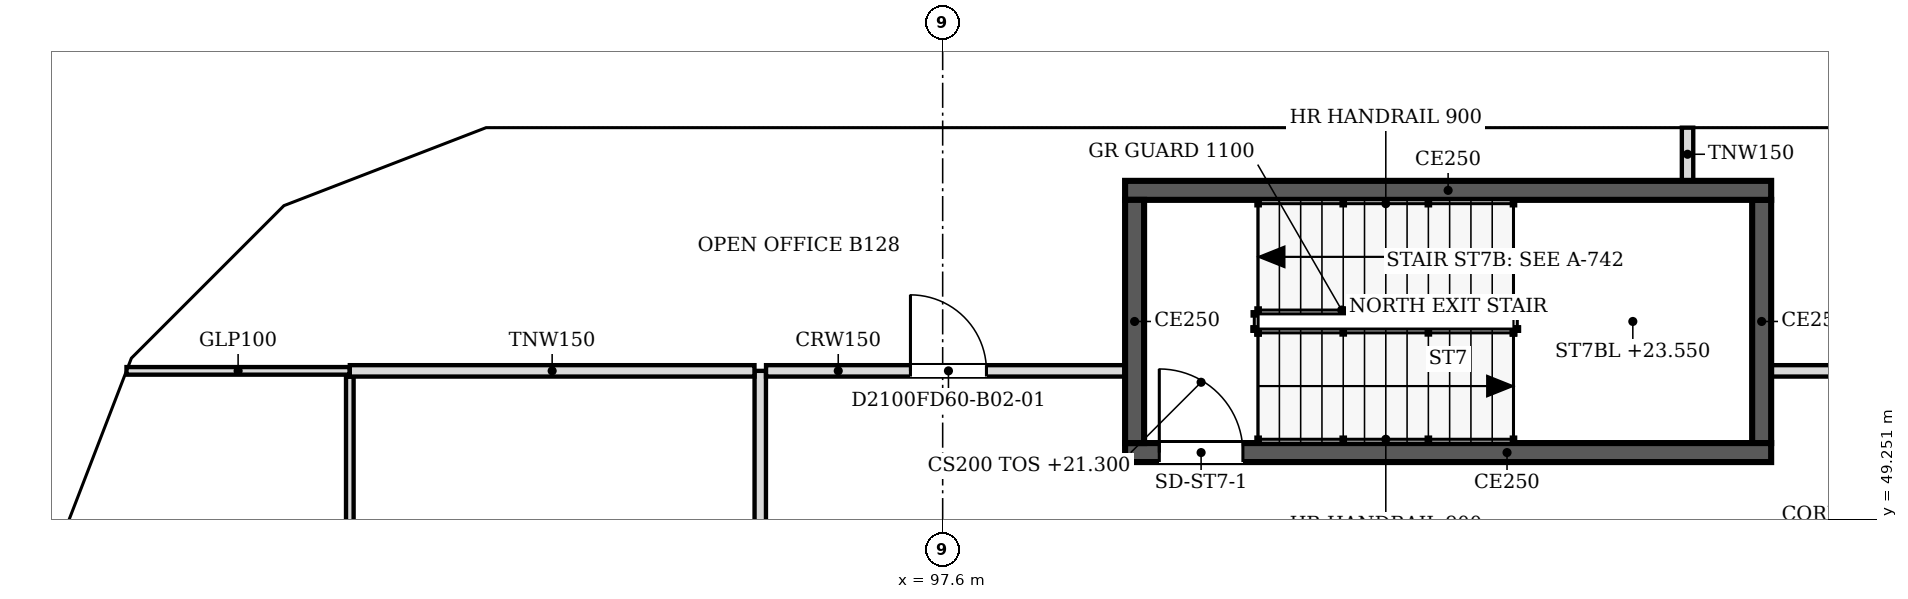
"""IFC4 building model, lengths in metres.
Left out: names, types, materials, properties, quantities, classifications, styles, units other than length and angle.
Written with IfcOpenShell. Run it as: python <this file> out.ifc"""

import sys

from ifc_helpers import new_model, si_unit, direction, frame, frame_2d, origin, place, context, subcontext, project, spatial, polyline, rectangle, outline, extrude, faceted_brep, source, transform, mapped, element, fill, save


model = new_model("IFC4")
c1 = context("Model", 3, precision=1e-05, world=origin(), true_north=direction((0.0, 1.0)))
c2 = subcontext(c1, "Body", "Model", "MODEL_VIEW")
j1 = project(units=[si_unit("LENGTHUNIT", "METRE"), si_unit("PLANEANGLEUNIT", "RADIAN")], contexts=[c1])
p1 = place(None, origin())
s1 = spatial("IfcSite", under=j1, at=p1, CompositionType="ELEMENT")
p2 = place(p1, origin())
s2 = spatial("IfcBuilding", under=s1, at=p2, CompositionType="ELEMENT")
p3 = place(p2, frame((0.0, 0.0, 21.3)))
s3 = spatial("IfcBuildingStorey", under=s2, at=p3, CompositionType="ELEMENT", Elevation=21.3)
m1 = source(origin(), c2, "Body", "SweptSolid", [
    extrude(outline(polyline([(3.05, 0.0), (6.1, 4.5), (3.05, 9.0), (0.0, 4.5), (3.05, 0.0)])), frame((0.0, 0.25, 0.0), z_axis=(0.0, -1.0, 0.0), x_axis=(1.0, 0.0, 0.0)), (0.0, 0.0, 1.0), 0.5),
])
p4 = place(p3, frame((109.8, 54.65, -4.5), z_axis=(0.0, 0.0, 1.0), x_axis=(-1.0, 0.0, 0.0)))
e1 = element("IfcWall", 1, at=p4, inside=s3, PredefinedType="SOLIDWALL", context=c2, shape_type="MappedRepresentation", body=[
    mapped(m1, transform((0.0, 0.0, 0.0), scale=1.0)),
])
m2 = source(origin(), c2, "Body", "SweptSolid", [
    extrude(outline(polyline([(3.05, 0.446), (5.798, 4.5), (3.05, 8.554), (0.302, 4.5), (3.05, 0.446)])), frame((0.0, 0.26, 0.0), z_axis=(0.0, -1.0, 0.0), x_axis=(1.0, 0.0, 0.0)), (0.0, 0.0, 1.0), 0.52),
])
p5 = place(p4, origin())
e2 = element("IfcOpeningElement", 2, at=p5, cuts=e1, PredefinedType="OPENING", context=c2, shape_type="MappedRepresentation", body=[
    mapped(m2, transform((0.0, 0.0, 0.0), scale=1.0)),
])
m3 = source(origin(), c2, "Body", "Brep", [
    faceted_brep([(3.05, -0.25, 0.0), (6.1, -0.25, 4.5), (6.1, -0.25, 4.5), (3.05, -0.25, 9.0), (0.0, -0.25, 4.5), (0.0, 0.25, 4.5), (3.05, 0.25, 9.0), (6.1, 0.25, 4.5), (6.1, 0.25, 4.5), (3.05, 0.25, 0.0)], [[[0, 1, 2, 3, 4]], [[5, 6, 7, 8, 9]], [[9, 8, 1, 0]], [[7, 6, 3, 2]], [[6, 5, 4, 3]], [[5, 9, 0, 4]], [[1, 8, 7, 2]]]),
])
p6 = place(p3, frame((103.7, 54.65, -4.5), z_axis=(0.0, 0.0, 1.0), x_axis=(-1.0, 0.0, 0.0)))
e3 = element("IfcWall", 3, at=p6, inside=s3, PredefinedType="SOLIDWALL", context=c2, shape_type="MappedRepresentation", body=[
    mapped(m3, transform((0.0, 0.0, 0.0), scale=1.0)),
])
p7 = place(p6, origin())
e4 = element("IfcOpeningElement", 4, at=p7, cuts=e3, PredefinedType="OPENING", context=c2, shape_type="MappedRepresentation", body=[
    mapped(m2, transform((0.0, 0.0, 0.0), scale=1.0)),
])
m4 = source(origin(), c2, "Body", "Brep", [
    faceted_brep([(3.05, -0.25, 0.0), (6.053, -0.25, 4.5), (3.05, -0.25, 9.0), (0.0, -0.25, 4.5), (0.0, 0.25, 4.5), (3.05, 0.25, 9.0), (6.007, 0.25, 4.57), (6.007, 0.25, 4.43), (3.05, 0.25, 0.0), (6.053, 0.0, 4.5)], [[[0, 1, 2, 3]], [[4, 5, 6, 7, 8]], [[8, 7, 9, 1, 0]], [[6, 5, 2, 1, 9]], [[5, 4, 3, 2]], [[4, 8, 0, 3]], [[9, 7, 6]]]),
])
p8 = place(p3, frame((97.6, 54.65, -4.5), z_axis=(0.0, 0.0, 1.0), x_axis=(-1.0, 0.0, 0.0)))
e5 = element("IfcWall", 5, at=p8, inside=s3, PredefinedType="SOLIDWALL", context=c2, shape_type="MappedRepresentation", body=[
    mapped(m4, transform((0.0, 0.0, 0.0), scale=1.0)),
])
m5 = source(origin(), c2, "Body", "SweptSolid", [
    extrude(outline(polyline([(3.048, 0.448), (5.753, 4.5), (3.048, 8.552), (0.302, 4.5), (3.048, 0.448)])), frame((0.0, 0.26, 0.0), z_axis=(0.0, -1.0, 0.0), x_axis=(1.0, 0.0, 0.0)), (0.0, 0.0, 1.0), 0.52),
])
p9 = place(p8, origin())
e6 = element("IfcOpeningElement", 6, at=p9, cuts=e5, PredefinedType="OPENING", context=c2, shape_type="MappedRepresentation", body=[
    mapped(m5, transform((0.0, 0.0, 0.0), scale=1.0)),
])
m6 = source(origin(), c2, "Body", "Brep", [
    faceted_brep([(2.95, -0.25, 0.0), (3.003, -0.25, 0.081), (3.003, -0.25, 8.919), (2.95, -0.25, 9.0), (0.0, -0.25, 4.5), (0.047, 0.25, 4.571), (2.898, 0.25, 8.919), (2.898, 0.25, 0.081), (0.047, 0.25, 4.429), (2.95, 0.0, 0.0), (2.95, 0.0, 9.0), (0.0, 0.0, 4.5)], [[[0, 1, 2, 3, 4]], [[5, 6, 7, 8]], [[1, 0, 9]], [[10, 3, 2]], [[6, 5, 11, 4, 3, 10]], [[8, 7, 9, 0, 4, 11]], [[8, 11, 5]], [[1, 9, 7, 6, 10, 2]]]),
])
p10 = place(p3, frame((91.547, 54.65, -4.5), z_axis=(0.0, 0.0, 1.0), x_axis=(-0.933007896601, -0.359855894603, 0.0)))
e7 = element("IfcWall", 7, at=p10, inside=s3, PredefinedType="SOLIDWALL", context=c2, shape_type="MappedRepresentation", body=[
    mapped(m6, transform((0.0, 0.0, 0.0), scale=1.0)),
])
m7 = source(origin(), c2, "Body", "SweptSolid", [
    extrude(outline(polyline([(2.75, 8.239), (0.299, 4.5), (2.75, 0.761), (2.75, 8.239)])), frame((0.0, 0.26, 0.0), z_axis=(0.0, -1.0, 0.0), x_axis=(1.0, 0.0, 0.0)), (0.0, 0.0, 1.0), 0.52),
])
p11 = place(p10, origin())
e8 = element("IfcOpeningElement", 8, at=p11, cuts=e7, PredefinedType="OPENING", context=c2, shape_type="MappedRepresentation", body=[
    mapped(m7, transform((0.0, 0.0, 0.0), scale=1.0)),
])
m8 = source(origin(), c2, "Body", "Brep", [
    faceted_brep([(0.053, -0.25, 0.0), (2.997, -0.25, 4.5), (0.053, -0.25, 9.0), (0.0, -0.25, 8.919), (0.0, -0.25, 0.081), (0.106, 0.25, 8.919), (2.944, 0.25, 4.581), (2.944, 0.25, 4.419), (0.106, 0.25, 0.081), (2.997, 0.0, 4.5), (0.053, 0.0, 0.0), (0.053, 0.0, 9.0)], [[[0, 1, 2, 3, 4]], [[5, 6, 7, 8]], [[8, 7, 9, 1, 0, 10]], [[6, 5, 11, 2, 1, 9]], [[3, 2, 11]], [[10, 0, 4]], [[8, 10, 4, 3, 11, 5]], [[9, 7, 6]]]),
])
p12 = place(p3, frame((88.831, 53.625, -4.5), z_axis=(0.0, 0.0, 1.0), x_axis=(-0.707147509625, -0.707066050402, 0.0)))
e9 = element("IfcWall", 9, at=p12, inside=s3, PredefinedType="SOLIDWALL", context=c2, shape_type="MappedRepresentation", body=[
    mapped(m8, transform((0.0, 0.0, 0.0), scale=1.0)),
])
m9 = source(origin(), c2, "Body", "SweptSolid", [
    extrude(outline(polyline([(0.253, 0.762), (2.698, 4.5), (0.253, 8.238), (0.253, 0.762)])), frame((0.0, 0.26, 0.0), z_axis=(0.0, -1.0, 0.0), x_axis=(1.0, 0.0, 0.0)), (0.0, 0.0, 1.0), 0.52),
])
p13 = place(p12, origin())
e10 = element("IfcOpeningElement", 10, at=p13, cuts=e9, PredefinedType="OPENING", context=c2, shape_type="MappedRepresentation", body=[
    mapped(m9, transform((0.0, 0.0, 0.0), scale=1.0)),
])
m10 = source(origin(), c2, "Body", "Brep", [
    faceted_brep([(2.95, -0.25, 0.0), (2.997, -0.25, 0.07), (2.997, -0.25, 8.93), (2.95, -0.25, 9.0), (0.0, -0.25, 4.5), (0.053, 0.25, 4.581), (2.904, 0.25, 8.929), (2.904, 0.25, 0.071), (0.053, 0.25, 4.419), (2.95, 0.0, 0.0), (2.95, 0.0, 9.0), (0.0, 0.0, 4.5)], [[[0, 1, 2, 3, 4]], [[5, 6, 7, 8]], [[1, 0, 9]], [[10, 3, 2]], [[6, 5, 11, 4, 3, 10]], [[8, 7, 9, 0, 4, 11]], [[8, 11, 5]], [[1, 9, 7, 6, 10, 2]]]),
])
p14 = place(p3, frame((86.712, 51.506, -4.5), z_axis=(0.0, 0.0, 1.0), x_axis=(-0.359874094142, -0.933000876937, 0.0)))
e11 = element("IfcWall", 11, at=p14, inside=s3, PredefinedType="SOLIDWALL", context=c2, shape_type="MappedRepresentation", body=[
    mapped(m10, transform((0.0, 0.0, 0.0), scale=1.0)),
])
p15 = place(p14, origin())
e12 = element("IfcOpeningElement", 12, at=p15, cuts=e11, PredefinedType="OPENING", context=c2, shape_type="MappedRepresentation", body=[
    mapped(m7, transform((0.0, 0.0, 0.0), scale=1.0)),
])
m11 = source(origin(), c2, "Body", "SweptSolid", [
    extrude(outline(polyline([(3.05, 0.0), (6.1, 4.5), (0.0, 4.5), (3.05, 0.0)])), frame((0.0, 0.25, 0.0), z_axis=(0.0, -1.0, 0.0), x_axis=(1.0, 0.0, 0.0)), (0.0, 0.0, 1.0), 0.5),
])
p16 = place(p3, frame((112.85, 54.65, 0.0), z_axis=(0.0, 0.0, 1.0), x_axis=(-1.0, 0.0, 0.0)))
e13 = element("IfcWall", 13, at=p16, inside=s3, PredefinedType="SOLIDWALL", context=c2, shape_type="MappedRepresentation", body=[
    mapped(m11, transform((0.0, 0.0, 0.0), scale=1.0)),
])
m12 = source(origin(), c2, "Body", "SweptSolid", [
    extrude(outline(polyline([(3.05, 0.446), (5.629, 4.25), (0.471, 4.25), (3.05, 0.446)])), frame((0.0, 0.26, 0.0), z_axis=(0.0, -1.0, 0.0), x_axis=(1.0, 0.0, 0.0)), (0.0, 0.0, 1.0), 0.52),
])
p17 = place(p16, origin())
e14 = element("IfcOpeningElement", 14, at=p17, cuts=e13, PredefinedType="OPENING", context=c2, shape_type="MappedRepresentation", body=[
    mapped(m12, transform((0.0, 0.0, 0.0), scale=1.0)),
])
p18 = place(p3, frame((106.75, 54.65, 0.0), z_axis=(0.0, 0.0, 1.0), x_axis=(-1.0, 0.0, 0.0)))
e15 = element("IfcWall", 15, at=p18, inside=s3, PredefinedType="SOLIDWALL", context=c2, shape_type="MappedRepresentation", body=[
    mapped(m11, transform((0.0, 0.0, 0.0), scale=1.0)),
])
p19 = place(p18, origin())
e16 = element("IfcOpeningElement", 16, at=p19, cuts=e15, PredefinedType="OPENING", context=c2, shape_type="MappedRepresentation", body=[
    mapped(m12, transform((0.0, 0.0, 0.0), scale=1.0)),
])
m13 = source(origin(), c2, "Body", "Brep", [
    faceted_brep([(3.05, -0.25, 0.0), (6.1, -0.25, 4.5), (6.1, -0.25, 4.5), (0.0, -0.25, 4.5), (0.0, 0.25, 4.5), (6.1, 0.25, 4.5), (6.1, 0.25, 4.5), (3.05, 0.25, 0.0)], [[[0, 1, 2, 3]], [[4, 5, 6, 7]], [[7, 6, 1, 0]], [[5, 4, 3, 2]], [[4, 7, 0, 3]], [[1, 6, 5, 2]]]),
])
p20 = place(p3, frame((100.65, 54.65, 0.0), z_axis=(0.0, 0.0, 1.0), x_axis=(-1.0, 0.0, 0.0)))
e17 = element("IfcWall", 17, at=p20, inside=s3, PredefinedType="SOLIDWALL", context=c2, shape_type="MappedRepresentation", body=[
    mapped(m13, transform((0.0, 0.0, 0.0), scale=1.0)),
])
p21 = place(p20, origin())
e18 = element("IfcOpeningElement", 18, at=p21, cuts=e17, PredefinedType="OPENING", context=c2, shape_type="MappedRepresentation", body=[
    mapped(m12, transform((0.0, 0.0, 0.0), scale=1.0)),
])
m14 = source(origin(), c2, "Body", "Brep", [
    faceted_brep([(3.003, -0.25, 0.0), (3.05, -0.25, 0.071), (3.05, -0.25, 4.5), (0.0, -0.25, 4.5), (0.0, 0.25, 4.5), (2.957, 0.25, 4.5), (2.957, 0.25, 0.07), (3.003, 0.0, 0.0)], [[[0, 1, 2, 3]], [[4, 5, 6]], [[1, 0, 7]], [[5, 4, 3, 2]], [[4, 6, 7, 0, 3]], [[1, 7, 6, 5, 2]]]),
])
p22 = place(p3, frame((94.55, 54.65, 0.0), z_axis=(0.0, 0.0, 1.0), x_axis=(-1.0, 0.0, 0.0)))
e19 = element("IfcWall", 19, at=p22, inside=s3, PredefinedType="SOLIDWALL", context=c2, shape_type="MappedRepresentation", body=[
    mapped(m14, transform((0.0, 0.0, 0.0), scale=1.0)),
])
m15 = source(origin(), c2, "Body", "SweptSolid", [
    extrude(outline(polyline([(2.803, 4.25), (0.468, 4.25), (2.803, 0.75), (2.803, 4.25)])), frame((0.0, 0.26, 0.0), z_axis=(0.0, -1.0, 0.0), x_axis=(1.0, 0.0, 0.0)), (0.0, 0.0, 1.0), 0.52),
])
p23 = place(p22, origin())
e20 = element("IfcOpeningElement", 20, at=p23, cuts=e19, PredefinedType="OPENING", context=c2, shape_type="MappedRepresentation", body=[
    mapped(m15, transform((0.0, 0.0, 0.0), scale=1.0)),
])
m16 = source(origin(), c2, "Body", "Brep", [
    faceted_brep([(0.047, -0.25, 0.0), (2.997, -0.25, 4.5), (0.0, -0.25, 4.5), (0.0, -0.25, 0.07), (0.093, 0.25, 4.5), (2.944, 0.25, 4.5), (2.944, 0.25, 4.419), (0.093, 0.25, 0.071), (2.997, 0.0, 4.5), (0.047, 0.0, 0.0)], [[[0, 1, 2, 3]], [[4, 5, 6, 7]], [[7, 6, 8, 1, 0, 9]], [[5, 4, 2, 1, 8]], [[9, 0, 3]], [[7, 9, 3, 2, 4]], [[6, 5, 8]]]),
])
p24 = place(p3, frame((91.59, 54.667, 0.0), z_axis=(0.0, 0.0, 1.0), x_axis=(-0.933000876937, -0.359874094142, 0.0)))
e21 = element("IfcWall", 21, at=p24, inside=s3, PredefinedType="SOLIDWALL", context=c2, shape_type="MappedRepresentation", body=[
    mapped(m16, transform((0.0, 0.0, 0.0), scale=1.0)),
])
m17 = source(origin(), c2, "Body", "SweptSolid", [
    extrude(outline(polyline([(0.247, 0.761), (2.534, 4.25), (0.247, 4.25), (0.247, 0.761)])), frame((0.0, 0.26, 0.0), z_axis=(0.0, -1.0, 0.0), x_axis=(1.0, 0.0, 0.0)), (0.0, 0.0, 1.0), 0.52),
])
p25 = place(p24, origin())
e22 = element("IfcOpeningElement", 22, at=p25, cuts=e21, PredefinedType="OPENING", context=c2, shape_type="MappedRepresentation", body=[
    mapped(m17, transform((0.0, 0.0, 0.0), scale=1.0)),
])
m18 = source(origin(), c2, "Body", "Brep", [
    faceted_brep([(2.944, -0.25, 0.0), (2.997, -0.25, 0.081), (2.997, -0.25, 4.5), (0.0, -0.25, 4.5), (0.053, 0.25, 4.5), (2.891, 0.25, 4.5), (2.891, 0.25, 0.081), (0.053, 0.25, 4.419), (2.944, 0.0, 0.0), (0.0, 0.0, 4.5)], [[[0, 1, 2, 3]], [[4, 5, 6, 7]], [[1, 0, 8]], [[5, 4, 9, 3, 2]], [[7, 6, 8, 0, 3, 9]], [[7, 9, 4]], [[1, 8, 6, 5, 2]]]),
])
p26 = place(p3, frame((88.794, 53.588, 0.0), z_axis=(0.0, 0.0, 1.0), x_axis=(-0.707066050402, -0.707147509625, 0.0)))
e23 = element("IfcWall", 23, at=p26, inside=s3, PredefinedType="SOLIDWALL", context=c2, shape_type="MappedRepresentation", body=[
    mapped(m18, transform((0.0, 0.0, 0.0), scale=1.0)),
])
m19 = source(origin(), c2, "Body", "SweptSolid", [
    extrude(outline(polyline([(2.744, 4.25), (0.462, 4.25), (2.744, 0.762), (2.744, 4.25)])), frame((0.0, 0.26, 0.0), z_axis=(0.0, -1.0, 0.0), x_axis=(1.0, 0.0, 0.0)), (0.0, 0.0, 1.0), 0.52),
])
p27 = place(p26, origin())
e24 = element("IfcOpeningElement", 24, at=p27, cuts=e23, PredefinedType="OPENING", context=c2, shape_type="MappedRepresentation", body=[
    mapped(m19, transform((0.0, 0.0, 0.0), scale=1.0)),
])
m20 = source(origin(), c2, "Body", "Brep", [
    faceted_brep([(0.053, -0.25, 0.0), (3.003, -0.25, 4.5), (0.0, -0.25, 4.5), (0.0, -0.25, 0.081), (0.106, 0.25, 4.5), (2.957, 0.25, 4.5), (2.957, 0.25, 4.429), (0.106, 0.25, 0.081), (3.003, 0.0, 4.5), (0.053, 0.0, 0.0)], [[[0, 1, 2, 3]], [[4, 5, 6, 7]], [[7, 6, 8, 1, 0, 9]], [[5, 4, 2, 1, 8]], [[9, 0, 3]], [[7, 9, 3, 2, 4]], [[6, 5, 8]]]),
])
p28 = place(p3, frame((86.731, 51.556, 0.0), z_axis=(0.0, 0.0, 1.0), x_axis=(-0.359855894603, -0.933007896601, 0.0)))
e25 = element("IfcWall", 25, at=p28, inside=s3, PredefinedType="SOLIDWALL", context=c2, shape_type="MappedRepresentation", body=[
    mapped(m20, transform((0.0, 0.0, 0.0), scale=1.0)),
])
m21 = source(origin(), c2, "Body", "SweptSolid", [
    extrude(outline(polyline([(0.253, 0.761), (2.541, 4.25), (0.253, 4.25), (0.253, 0.761)])), frame((0.0, 0.26, 0.0), z_axis=(0.0, -1.0, 0.0), x_axis=(1.0, 0.0, 0.0)), (0.0, 0.0, 1.0), 0.52),
])
p29 = place(p28, origin())
e26 = element("IfcOpeningElement", 26, at=p29, cuts=e25, PredefinedType="OPENING", context=c2, shape_type="MappedRepresentation", body=[
    mapped(m21, transform((0.0, 0.0, 0.0), scale=1.0)),
])
p30 = place(p3, frame((108.5, 50.125, 0.0), z_axis=(0.0, 0.0, 1.0), x_axis=(-1.0, 0.0, 0.0)))
e27 = element("IfcWall", 27, at=p30, inside=s3, PredefinedType="SOLIDWALL", context=c2, shape_type="SweptSolid", body=[
    extrude(rectangle(XDim=8.5, YDim=0.25, at=frame_2d((4.25, 0.0))), origin(), (0.0, 0.0, 1.0), 4.5),
])
m22 = source(origin(), c2, "Body", "SweptSolid", [
    extrude(rectangle(XDim=1.1, YDim=2.1, at=frame_2d((0.55, 1.05))), frame((0.0, 0.135, 0.0), z_axis=(0.0, -1.0, 0.0), x_axis=(1.0, 0.0, 0.0)), (0.0, 0.0, 1.0), 0.27),
])
p31 = place(p30, frame((6.95, 0.0, 0.0)))
e28 = element("IfcOpeningElement", 28, at=p31, cuts=e27, PredefinedType="OPENING", context=c2, shape_type="MappedRepresentation", body=[
    mapped(m22, transform((0.0, 0.0, 0.0), scale=1.0)),
])
p32 = place(p3, frame((100.125, 50.25, 0.0), z_axis=(0.0, 0.0, 1.0), x_axis=(0.0, 1.0, 0.0)))
e29 = element("IfcWall", 29, at=p32, inside=s3, PredefinedType="SOLIDWALL", context=c2, shape_type="SweptSolid", body=[
    extrude(rectangle(XDim=3.2, YDim=0.25, at=frame_2d((1.6, 0.0))), origin(), (0.0, 0.0, 1.0), 4.5),
])
p33 = place(p3, frame((100.0, 53.575, 0.0), z_axis=(0.0, 0.0, 1.0), x_axis=(1.0, 0.0, 0.0)))
e30 = element("IfcWall", 30, at=p33, inside=s3, PredefinedType="SOLIDWALL", context=c2, shape_type="SweptSolid", body=[
    extrude(rectangle(XDim=8.5, YDim=0.25, at=frame_2d((4.25, 0.0))), origin(), (0.0, 0.0, 1.0), 4.5),
])
p34 = place(p3, frame((108.375, 53.45, 0.0), z_axis=(0.0, 0.0, 1.0), x_axis=(0.0, -1.0, 0.0)))
e31 = element("IfcWall", 31, at=p34, inside=s3, PredefinedType="SOLIDWALL", context=c2, shape_type="SweptSolid", body=[
    extrude(rectangle(XDim=3.2, YDim=0.25, at=frame_2d((1.6, 0.0))), origin(), (0.0, 0.0, 1.0), 4.5),
])
p35 = place(p3, frame((95.2, 45.75, 0.0), z_axis=(0.0, 0.0, 1.0), x_axis=(0.0, 1.0, 0.0)))
e32 = element("IfcWall", 32, at=p35, inside=s3, PredefinedType="PARTITIONING", context=c2, shape_type="SweptSolid", body=[
    extrude(rectangle(XDim=5.45, YDim=0.15, at=frame_2d((2.725, 0.0))), origin(), (0.0, 0.0, 1.0), 3.767),
])
m23 = source(origin(), c2, "Body", "SweptSolid", [
    extrude(rectangle(XDim=0.9, YDim=2.1, at=frame_2d((0.45, 1.05))), frame((0.0, 0.085, 0.0), z_axis=(0.0, -1.0, 0.0), x_axis=(1.0, 0.0, 0.0)), (0.0, 0.0, 1.0), 0.17),
])
p36 = place(p35, frame((2.3, 0.0, 0.0)))
e33 = element("IfcOpeningElement", 33, at=p36, cuts=e32, PredefinedType="OPENING", context=c2, shape_type="MappedRepresentation", body=[
    mapped(m23, transform((0.0, 0.0, 0.0), scale=1.0)),
])
p37 = place(p3, frame((89.8, 45.826, 0.0), z_axis=(0.0, 0.0, 1.0), x_axis=(0.0, 1.0, 0.0)))
e34 = element("IfcWall", 34, at=p37, inside=s3, PredefinedType="PARTITIONING", context=c2, shape_type="SweptSolid", body=[
    extrude(rectangle(XDim=5.298, YDim=0.1, at=frame_2d((2.649, 0.0))), origin(), (0.0, 0.0, 1.0), 3.767),
])
m24 = source(origin(), c2, "Body", "SweptSolid", [
    extrude(rectangle(XDim=0.9, YDim=2.1, at=frame_2d((0.45, 1.05))), frame((0.0, 0.06, 0.0), z_axis=(0.0, -1.0, 0.0), x_axis=(1.0, 0.0, 0.0)), (0.0, 0.0, 1.0), 0.12),
])
p38 = place(p37, frame((2.2, 0.0, 0.0)))
e35 = element("IfcOpeningElement", 35, at=p38, cuts=e34, PredefinedType="OPENING", context=c2, shape_type="MappedRepresentation", body=[
    mapped(m24, transform((0.0, 0.0, 0.0), scale=1.0)),
])
p39 = place(p3, frame((86.862, 51.2, 0.0), z_axis=(0.0, 0.0, 1.0), x_axis=(1.0, 0.0, 0.0)))
e36 = element("IfcWall", 36, at=p39, inside=s3, PredefinedType="PARTITIONING", context=c2, shape_type="SweptSolid", body=[
    extrude(rectangle(XDim=2.937, YDim=0.1, at=frame_2d((1.469, 0.0))), origin(), (0.0, 0.0, 1.0), 3.767),
])
p40 = place(p3, frame((89.8, 51.2, 0.0), z_axis=(0.0, 0.0, 1.0), x_axis=(1.0, 0.0, 0.0)))
e37 = element("IfcWall", 37, at=p40, inside=s3, PredefinedType="PARTITIONING", context=c2, shape_type="SweptSolid", body=[
    extrude(rectangle(XDim=5.324, YDim=0.15, at=frame_2d((2.662, 0.0))), origin(), (0.0, 0.0, 1.0), 3.767),
])
p41 = place(p3, frame((95.276, 51.2, 0.0), z_axis=(0.0, 0.0, 1.0), x_axis=(1.0, 0.0, 0.0)))
e38 = element("IfcWall", 38, at=p41, inside=s3, PredefinedType="PARTITIONING", context=c2, shape_type="SweptSolid", body=[
    extrude(rectangle(XDim=4.724, YDim=0.15, at=frame_2d((2.362, 0.0))), origin(), (0.0, 0.0, 1.0), 3.767),
])
m25 = source(origin(), c2, "Body", "SweptSolid", [
    extrude(rectangle(XDim=1.0, YDim=2.1, at=frame_2d((0.5, 1.05))), frame((0.0, 0.085, 0.0), z_axis=(0.0, -1.0, 0.0), x_axis=(1.0, 0.0, 0.0)), (0.0, 0.0, 1.0), 0.17),
])
p42 = place(p41, frame((1.9, 0.0, 0.0)))
e39 = element("IfcOpeningElement", 39, at=p42, cuts=e38, PredefinedType="OPENING", context=c2, shape_type="MappedRepresentation", body=[
    mapped(m25, transform((0.0, 0.0, 0.0), scale=1.0)),
])
p43 = place(p3, frame((108.5, 51.2, 0.0), z_axis=(0.0, 0.0, 1.0), x_axis=(1.0, 0.0, 0.0)))
e40 = element("IfcWall", 40, at=p43, inside=s3, PredefinedType="PARTITIONING", context=c2, shape_type="SweptSolid", body=[
    extrude(rectangle(XDim=15.9, YDim=0.15, at=frame_2d((7.95, 0.0))), origin(), (0.0, 0.0, 1.0), 3.767),
])
p44 = place(p43, frame((7.5, 0.0, 0.0)))
e41 = element("IfcOpeningElement", 41, at=p44, cuts=e40, PredefinedType="OPENING", context=c2, shape_type="MappedRepresentation", body=[
    mapped(m23, transform((0.0, 0.0, 0.0), scale=1.0)),
])
p45 = place(p3, frame((107.4, 53.7, 0.0), z_axis=(0.0, 0.0, 1.0), x_axis=(0.0, 1.0, 0.0)))
e42 = element("IfcWall", 42, at=p45, inside=s3, PredefinedType="PARTITIONING", context=c2, shape_type="SweptSolid", body=[
    extrude(rectangle(XDim=0.7, YDim=0.15, at=frame_2d((0.35, 0.0))), origin(), (0.0, 0.0, 1.0), 3.767),
])
m26 = source(origin(), c2, "Body", "SweptSolid", [
    extrude(rectangle(XDim=1.1, YDim=2.1, at=frame_2d((0.55, 1.05))), frame((0.0, 0.025, 0.0), z_axis=(0.0, -1.0, 0.0), x_axis=(1.0, 0.0, 0.0)), (0.0, 0.0, 1.0), 0.05),
])
p46 = place(p31, origin())
e43 = element("IfcDoor", 43, at=p46, inside=s3, OperationType="SINGLE_SWING_RIGHT", PredefinedType="DOOR", context=c2, shape_type="MappedRepresentation", body=[
    mapped(m26, transform((0.0, 0.0, 0.0), scale=1.0)),
])
fill(e28, e43)
m27 = source(origin(), c2, "Body", "SweptSolid", [
    extrude(rectangle(XDim=1.0, YDim=2.1, at=frame_2d((0.5, 1.05))), frame((0.0, 0.025, 0.0), z_axis=(0.0, -1.0, 0.0), x_axis=(1.0, 0.0, 0.0)), (0.0, 0.0, 1.0), 0.05),
])
p47 = place(p42, origin())
e44 = element("IfcDoor", 44, at=p47, inside=s3, OperationType="SINGLE_SWING_LEFT", PredefinedType="DOOR", context=c2, shape_type="MappedRepresentation", body=[
    mapped(m27, transform((0.0, 0.0, 0.0), scale=1.0)),
])
fill(e39, e44)
save(model, sys.argv[1])
